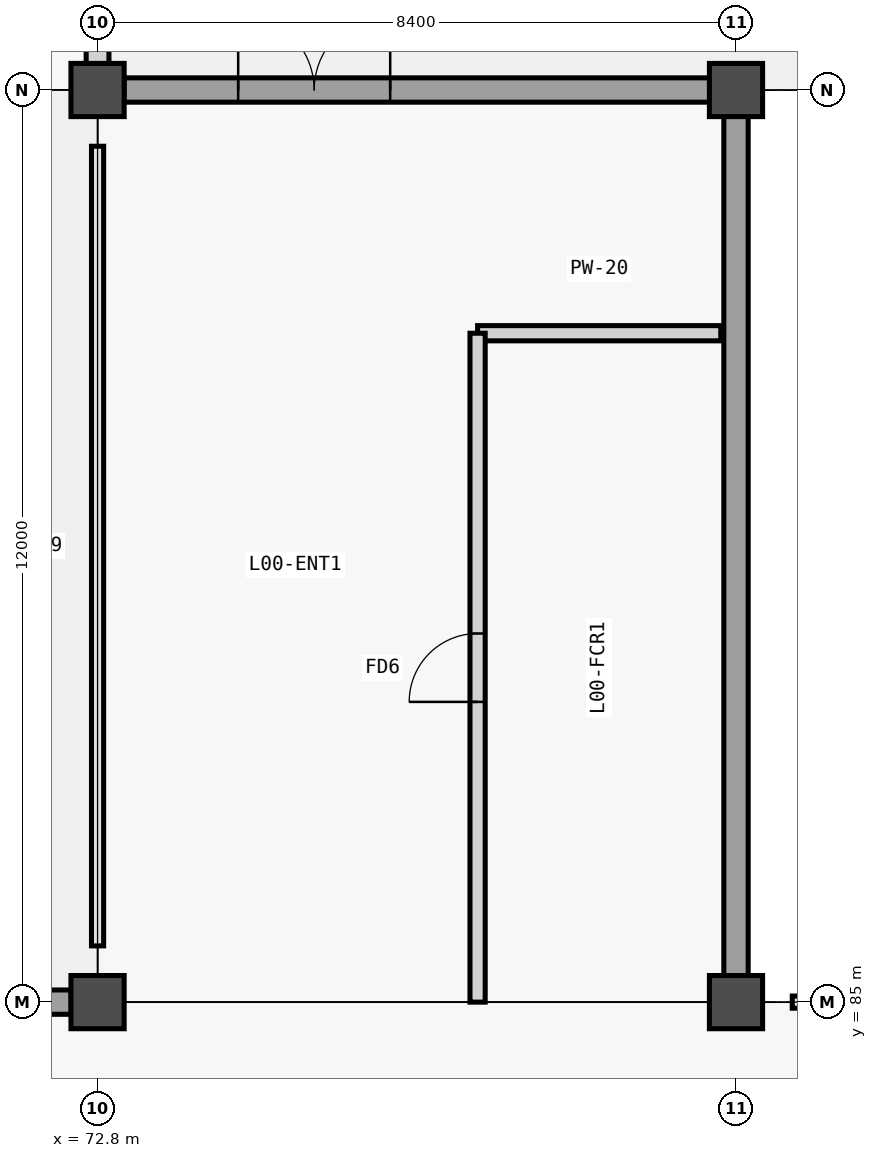
"""IFC4 building model, lengths in metres.
Left out: names, types, materials, properties, quantities, classifications, styles, units other than length and angle.
Written with IfcOpenShell. Run it as: python <this file> out.ifc"""

import sys

from ifc_helpers import new_model, si_unit, direction, frame, frame_2d, origin, origin_2d, place, context, subcontext, project, spatial, rectangle, circle, extrude, element, fill, save


model = new_model("IFC4")
c1 = context("Model", 3, precision=1e-05, world=origin(), true_north=direction((0.0, 1.0)))
c2 = subcontext(c1, "Body", "Model", "MODEL_VIEW")
j1 = project(units=[si_unit("LENGTHUNIT", "METRE"), si_unit("PLANEANGLEUNIT", "RADIAN")], contexts=[c1])
p1 = place(None, origin())
s1 = spatial("IfcSite", under=j1, at=p1, CompositionType="ELEMENT")
p2 = place(p1, origin())
s2 = spatial("IfcBuilding", under=s1, at=p2, CompositionType="ELEMENT")
p3 = place(p2, origin())
s3 = spatial("IfcBuildingStorey", under=s2, at=p3, CompositionType="ELEMENT", Elevation=0.0)
for number, where, z_axis, x_axis in (
    (1, (72.8, 85.0, 0.0), (0.0, 0.0, 1.0), (1.0, 0.0, 0.0)),
    (2, (72.8, 97.0, 0.0), (0.0, 0.0, 1.0), (1.0, 0.0, 0.0)),
    (3, (81.2, 85.0, 0.0), (0.0, 0.0, 1.0), (1.0, 0.0, 0.0)),
    (4, (81.2, 97.0, 0.0), (0.0, 0.0, 1.0), (1.0, 0.0, 0.0)),
):
    element("IfcColumn", number, at=place(p3, frame(where, z_axis=z_axis, x_axis=x_axis)), inside=s3, PredefinedType="COLUMN", context=c2, shape_type="SweptSolid", body=[
        extrude(circle(Radius=0.35, at=origin_2d()), origin(), (0.0, 0.0, 1.0), 5.4),
    ])
p4 = place(p3, frame((72.8, 111.177, 0.0), z_axis=(0.0, 0.0, 1.0), x_axis=(0.0, -1.0, 0.0)))
e5 = element("IfcWall", 5, at=p4, inside=s3, PredefinedType="SOLIDWALL", context=c2, shape_type="SweptSolid", body=[
    extrude(rectangle(XDim=13.829, YDim=0.3, at=frame_2d((6.915, 0.0))), origin(), (0.0, 0.0, 1.0), 4.49),
])
p5 = place(p3, frame((73.148, 97.0, 0.0), z_axis=(0.0, 0.0, 1.0), x_axis=(1.0, 0.0, 0.0)))
e6 = element("IfcWall", 6, at=p5, inside=s3, PredefinedType="SOLIDWALL", context=c2, shape_type="SweptSolid", body=[
    extrude(rectangle(XDim=7.704, YDim=0.32, at=frame_2d((3.852, 0.0))), origin(), (0.0, 0.0, 1.0), 5.1),
])
p6 = place(p5, frame((1.502, 0.0, 0.0)))
e7 = element("IfcOpeningElement", 7, at=p6, cuts=e6, PredefinedType="OPENING", context=c2, shape_type="SweptSolid", body=[
    extrude(rectangle(XDim=2.0, YDim=2.4, at=frame_2d((1.0, 1.2))), frame((0.0, 0.17, 0.0), z_axis=(0.0, -1.0, 0.0), x_axis=(1.0, 0.0, 0.0)), (0.0, 0.0, 1.0), 0.34),
])
p7 = place(p3, frame((81.2, 96.652, 0.0), z_axis=(0.0, 0.0, 1.0), x_axis=(0.0, -1.0, 0.0)))
e8 = element("IfcWall", 8, at=p7, inside=s3, PredefinedType="SOLIDWALL", context=c2, shape_type="SweptSolid", body=[
    extrude(rectangle(XDim=11.304, YDim=0.32, at=frame_2d((5.652, 0.0))), origin(), (0.0, 0.0, 1.0), 5.1),
])
p8 = place(p3, frame((64.673, 85.0, 0.0), z_axis=(0.0, 0.0, 1.0), x_axis=(1.0, 0.0, 0.0)))
e9 = element("IfcWall", 9, at=p8, inside=s3, PredefinedType="SOLIDWALL", context=c2, shape_type="SweptSolid", body=[
    extrude(rectangle(XDim=7.779, YDim=0.32, at=frame_2d((3.889, 0.0))), origin(), (0.0, 0.0, 1.0), 5.12),
])
p9 = place(p8, frame((2.647, 0.0, 0.0)))
e10 = element("IfcOpeningElement", 10, at=p9, cuts=e9, PredefinedType="OPENING", context=c2, shape_type="SweptSolid", body=[
    extrude(rectangle(XDim=2.0, YDim=2.4, at=frame_2d((1.0, 1.2))), frame((0.0, 0.17, 0.0), z_axis=(0.0, -1.0, 0.0), x_axis=(1.0, 0.0, 0.0)), (0.0, 0.0, 1.0), 0.34),
])
p10 = place(p3, frame((77.8, 93.8, 0.0), z_axis=(0.0, 0.0, 1.0), x_axis=(1.0, 0.0, 0.0)))
e11 = element("IfcWall", 11, at=p10, inside=s3, PredefinedType="PARTITIONING", context=c2, shape_type="SweptSolid", body=[
    extrude(rectangle(XDim=3.2, YDim=0.2, at=frame_2d((1.6, 0.0))), origin(), (0.0, 0.0, 1.0), 5.14),
])
p11 = place(p3, frame((77.8, 85.0, 0.0), z_axis=(0.0, 0.0, 1.0), x_axis=(0.0, 1.0, 0.0)))
e12 = element("IfcWall", 12, at=p11, inside=s3, PredefinedType="PARTITIONING", context=c2, shape_type="SweptSolid", body=[
    extrude(rectangle(XDim=8.8, YDim=0.2, at=frame_2d((4.4, 0.0))), origin(), (0.0, 0.0, 1.0), 5.14),
])
p12 = place(p11, frame((3.95, 0.0, 0.0)))
e13 = element("IfcOpeningElement", 13, at=p12, cuts=e12, PredefinedType="OPENING", context=c2, shape_type="SweptSolid", body=[
    extrude(rectangle(XDim=0.9, YDim=2.1, at=frame_2d((0.45, 1.05))), frame((0.0, 0.11, 0.0), z_axis=(0.0, -1.0, 0.0), x_axis=(1.0, 0.0, 0.0)), (0.0, 0.0, 1.0), 0.22),
])
p13 = place(p6, origin())
e14 = element("IfcDoor", 14, at=p13, inside=s3, OperationType="DOUBLE_DOOR_SINGLE_SWING", PredefinedType="DOOR", context=c2, shape_type="SweptSolid", body=[
    extrude(rectangle(XDim=2.0, YDim=2.4, at=frame_2d((1.0, 1.2))), frame((0.0, 0.025, 0.0), z_axis=(0.0, -1.0, 0.0), x_axis=(1.0, 0.0, 0.0)), (0.0, 0.0, 1.0), 0.05),
])
fill(e7, e14)
p14 = place(p12, origin())
e15 = element("IfcDoor", 15, at=p14, inside=s3, OperationType="SINGLE_SWING_LEFT", PredefinedType="DOOR", context=c2, shape_type="SweptSolid", body=[
    extrude(rectangle(XDim=0.9, YDim=2.1, at=frame_2d((0.45, 1.05))), frame((0.0, 0.025, 0.0), z_axis=(0.0, -1.0, 0.0), x_axis=(1.0, 0.0, 0.0)), (0.0, 0.0, 1.0), 0.05),
])
fill(e13, e15)
save(model, sys.argv[1])
